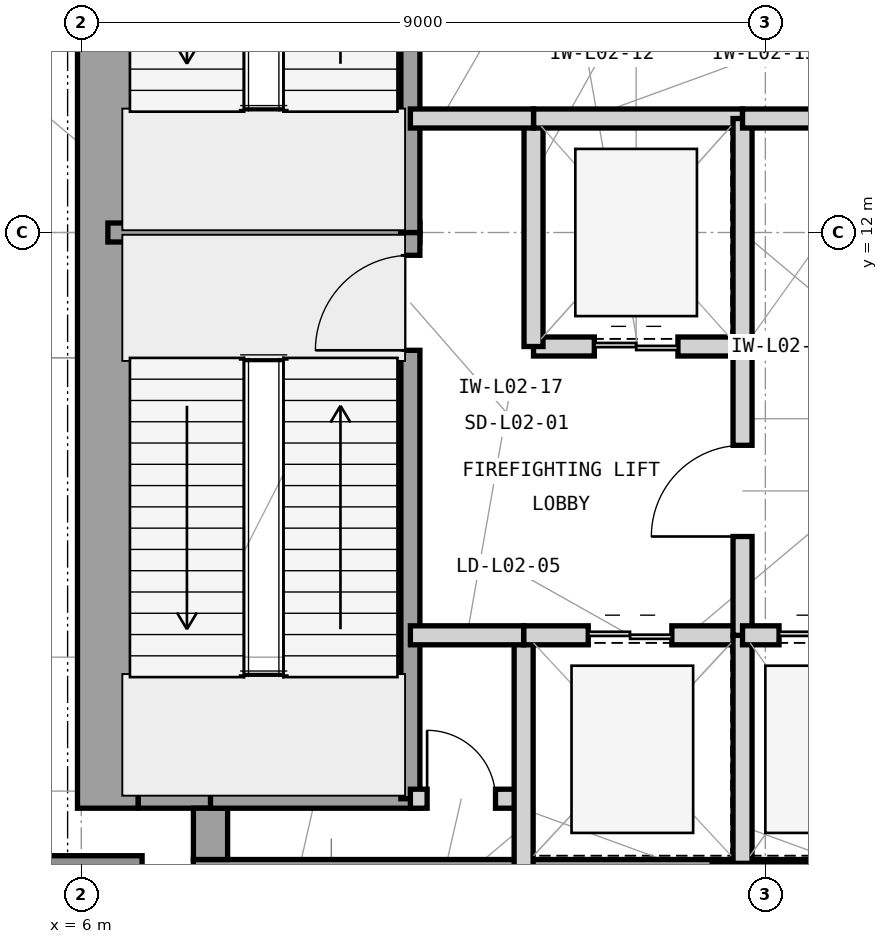
"""IFC4 building model, lengths in metres.
Left out: names, types, materials, properties, quantities, classifications, styles, units other than length and angle.
Written with IfcOpenShell. Run it as: python <this file> out.ifc"""

import sys

from ifc_helpers import new_model, si_unit, direction, frame, frame_2d, origin, origin_2d, place, context, subcontext, project, spatial, rectangle, extrude, element, fill, save


model = new_model("IFC4")
c1 = context("Model", 3, precision=1e-05, world=origin(), true_north=direction((0.0, 1.0)))
c2 = subcontext(c1, "Body", "Model", "MODEL_VIEW")
j1 = project(units=[si_unit("LENGTHUNIT", "METRE"), si_unit("PLANEANGLEUNIT", "RADIAN")], contexts=[c1])
p1 = place(None, origin())
s1 = spatial("IfcSite", under=j1, at=p1, CompositionType="ELEMENT")
p2 = place(p1, origin())
s2 = spatial("IfcBuilding", under=s1, at=p2, CompositionType="ELEMENT")
p3 = place(p2, frame((0.0, 0.0, 10.8)))
s3 = spatial("IfcBuildingStorey", under=s2, at=p3, CompositionType="ELEMENT", Elevation=10.8)
p4 = place(p3, frame((7.475, 3.35, 0.0), z_axis=(0.0, 0.0, 1.0), x_axis=(1.0, 0.0, 0.0)))
e1 = element("IfcWall", 1, at=p4, inside=s3, PredefinedType="SHEAR", context=c2, shape_type="SweptSolid", body=[
    extrude(rectangle(XDim=16.575, YDim=0.8, at=frame_2d((8.288, 0.0))), origin(), (0.0, 0.0, 1.0), 5.4),
])
p5 = place(p3, frame((6.35, 4.425, 0.0), z_axis=(0.0, 0.0, 1.0), x_axis=(0.0, 1.0, 0.0)))
e2 = element("IfcWall", 2, at=p5, inside=s3, PredefinedType="SHEAR", context=c2, shape_type="SweptSolid", body=[
    extrude(rectangle(XDim=15.15, YDim=0.8, at=frame_2d((7.575, 0.0))), origin(), (0.0, 0.0, 1.0), 5.4),
])
p6 = place(p3, frame((6.75, 4.65, 0.0), z_axis=(0.0, 0.0, 1.0), x_axis=(1.0, 0.0, 0.0)))
e3 = element("IfcWall", 3, at=p6, inside=s3, PredefinedType="SHEAR", context=c2, shape_type="SweptSolid", body=[
    extrude(rectangle(XDim=1.175, YDim=0.45, at=frame_2d((0.587, 0.0))), origin(), (0.0, 0.0, 1.0), 5.4),
])
p7 = place(p3, frame((7.7, 3.75, 0.0), z_axis=(0.0, 0.0, 1.0), x_axis=(0.0, 1.0, 0.0)))
e4 = element("IfcWall", 4, at=p7, inside=s3, PredefinedType="SHEAR", context=c2, shape_type="SweptSolid", body=[
    extrude(rectangle(XDim=0.675, YDim=0.45, at=frame_2d((0.337, 0.0))), origin(), (0.0, 0.0, 1.0), 5.4),
])
p8 = place(p3, frame((6.0, 3.0, 0.0), z_axis=(0.0, 0.0, 1.0), x_axis=(1.0, 0.0, 0.0)))
e5 = element("IfcColumn", 5, at=p8, inside=s3, PredefinedType="COLUMN", context=c2, shape_type="SweptSolid", body=[
    extrude(rectangle(XDim=1.6, YDim=1.6, at=origin_2d()), origin(), (0.0, 0.0, 1.0), 4.8),
])
p9 = place(p3, frame((15.0, 3.0, 0.0), z_axis=(0.0, 0.0, 1.0), x_axis=(1.0, 0.0, 0.0)))
e6 = element("IfcColumn", 6, at=p9, inside=s3, PredefinedType="COLUMN", context=c2, shape_type="SweptSolid", body=[
    extrude(rectangle(XDim=1.4, YDim=1.4, at=origin_2d()), origin(), (0.0, 0.0, 1.0), 4.8),
])
p10 = place(p3, frame((6.35, 12.0, 0.0), z_axis=(0.0, 0.0, 1.0), x_axis=(1.0, 0.0, 0.0)))
e7 = element("IfcWall", 7, at=p10, inside=s3, PredefinedType="SHEAR", context=c2, shape_type="SweptSolid", body=[
    extrude(rectangle(XDim=4.105, YDim=0.25, at=frame_2d((2.052, 0.0))), origin(), (0.0, 0.0, 1.0), 5.4),
])
p11 = place(p3, frame((7.7, 4.55, 0.0), z_axis=(0.0, 0.0, 1.0), x_axis=(1.0, 0.0, 0.0)))
e8 = element("IfcWall", 8, at=p11, inside=s3, PredefinedType="SHEAR", context=c2, shape_type="SweptSolid", body=[
    extrude(rectangle(XDim=2.755, YDim=0.25, at=frame_2d((1.377, 0.0))), origin(), (0.0, 0.0, 1.0), 5.4),
])
p12 = place(p3, frame((10.33, 4.55, 0.0), z_axis=(0.0, 0.0, 1.0), x_axis=(0.0, 1.0, 0.0)))
e9 = element("IfcWall", 9, at=p12, inside=s3, PredefinedType="SHEAR", context=c2, shape_type="SweptSolid", body=[
    extrude(rectangle(XDim=7.45, YDim=0.25, at=frame_2d((3.725, 0.0))), origin(), (0.0, 0.0, 1.0), 5.4),
])
p13 = place(p12, frame((5.9, 0.0, 0.0)))
e10 = element("IfcOpeningElement", 10, at=p13, cuts=e9, PredefinedType="OPENING", context=c2, shape_type="SweptSolid", body=[
    extrude(rectangle(XDim=1.25, YDim=2.2, at=frame_2d((0.625, 1.1))), frame((0.0, 0.135, 0.0), z_axis=(0.0, -1.0, 0.0), x_axis=(1.0, 0.0, 0.0)), (0.0, 0.0, 1.0), 0.27),
])
p14 = place(p3, frame((10.33, 12.0, 0.0), z_axis=(0.0, 0.0, 1.0), x_axis=(0.0, 1.0, 0.0)))
e11 = element("IfcWall", 11, at=p14, inside=s3, PredefinedType="SHEAR", context=c2, shape_type="SweptSolid", body=[
    extrude(rectangle(XDim=7.45, YDim=0.25, at=frame_2d((3.725, 0.0))), origin(), (0.0, 0.0, 1.0), 5.4),
])
p15 = place(p14, frame((5.85, 0.0, 0.0)))
e12 = element("IfcOpeningElement", 12, at=p15, cuts=e11, PredefinedType="OPENING", context=c2, shape_type="SweptSolid", body=[
    extrude(rectangle(XDim=1.25, YDim=2.2, at=frame_2d((0.625, 1.1))), frame((0.0, 0.135, 0.0), z_axis=(0.0, -1.0, 0.0), x_axis=(1.0, 0.0, 0.0)), (0.0, 0.0, 1.0), 0.27),
])
p16 = place(p3, frame((10.33, 4.55, 0.0), z_axis=(0.0, 0.0, 1.0), x_axis=(1.0, 0.0, 0.0)))
e13 = element("IfcWall", 13, at=p16, inside=s3, PredefinedType="PARTITIONING", context=c2, shape_type="SweptSolid", body=[
    extrude(rectangle(XDim=1.49, YDim=0.25, at=frame_2d((0.745, 0.0))), origin(), (0.0, 0.0, 1.0), 4.79),
])
p17 = place(p16, frame((0.22, 0.0, 0.0)))
e14 = element("IfcOpeningElement", 14, at=p17, cuts=e13, PredefinedType="OPENING", context=c2, shape_type="SweptSolid", body=[
    extrude(rectangle(XDim=0.9, YDim=2.1, at=frame_2d((0.45, 1.05))), frame((0.0, 0.135, 0.0), z_axis=(0.0, -1.0, 0.0), x_axis=(1.0, 0.0, 0.0)), (0.0, 0.0, 1.0), 0.27),
])
p18 = place(p3, frame((11.82, 3.35, 0.0), z_axis=(0.0, 0.0, 1.0), x_axis=(0.0, 1.0, 0.0)))
e15 = element("IfcWall", 15, at=p18, inside=s3, PredefinedType="PARTITIONING", context=c2, shape_type="SweptSolid", body=[
    extrude(rectangle(XDim=3.35, YDim=0.25, at=frame_2d((1.675, 0.0))), origin(), (0.0, 0.0, 1.0), 4.79),
])
p19 = place(p3, frame((11.82, 6.7, 0.0), z_axis=(0.0, 0.0, 1.0), x_axis=(1.0, 0.0, 0.0)))
e16 = element("IfcWall", 16, at=p19, inside=s3, PredefinedType="PARTITIONING", context=c2, shape_type="SweptSolid", body=[
    extrude(rectangle(XDim=2.88, YDim=0.25, at=frame_2d((1.44, 0.0))), origin(), (0.0, 0.0, 1.0), 4.173),
])
p20 = place(p19, frame((0.85, 0.0, 0.0)))
e17 = element("IfcOpeningElement", 17, at=p20, cuts=e16, PredefinedType="OPENING", context=c2, shape_type="SweptSolid", body=[
    extrude(rectangle(XDim=1.1, YDim=2.25, at=frame_2d((0.55, 1.125))), frame((0.0, 0.135, 0.0), z_axis=(0.0, -1.0, 0.0), x_axis=(1.0, 0.0, 0.0)), (0.0, 0.0, 1.0), 0.27),
])
p21 = place(p3, frame((14.7, 3.35, 0.0), z_axis=(0.0, 0.0, 1.0), x_axis=(0.0, 1.0, 0.0)))
e18 = element("IfcWall", 18, at=p21, inside=s3, PredefinedType="PARTITIONING", context=c2, shape_type="SweptSolid", body=[
    extrude(rectangle(XDim=3.35, YDim=0.25, at=frame_2d((1.675, 0.0))), origin(), (0.0, 0.0, 1.0), 4.79),
])
p22 = place(p3, frame((11.95, 10.5, 0.0), z_axis=(0.0, 0.0, 1.0), x_axis=(1.0, 0.0, 0.0)))
e19 = element("IfcWall", 19, at=p22, inside=s3, PredefinedType="PARTITIONING", context=c2, shape_type="SweptSolid", body=[
    extrude(rectangle(XDim=2.75, YDim=0.25, at=frame_2d((1.375, 0.0))), origin(), (0.0, 0.0, 1.0), 4.173),
])
p23 = place(p22, frame((0.8, 0.0, 0.0)))
e20 = element("IfcOpeningElement", 20, at=p23, cuts=e19, PredefinedType="OPENING", context=c2, shape_type="SweptSolid", body=[
    extrude(rectangle(XDim=1.1, YDim=2.25, at=frame_2d((0.55, 1.125))), frame((0.0, 0.135, 0.0), z_axis=(0.0, -1.0, 0.0), x_axis=(1.0, 0.0, 0.0)), (0.0, 0.0, 1.0), 0.27),
])
p24 = place(p3, frame((11.95, 10.5, 0.0), z_axis=(0.0, 0.0, 1.0), x_axis=(0.0, 1.0, 0.0)))
e21 = element("IfcWall", 21, at=p24, inside=s3, PredefinedType="PARTITIONING", context=c2, shape_type="SweptSolid", body=[
    extrude(rectangle(XDim=3.0, YDim=0.25, at=frame_2d((1.5, 0.0))), origin(), (0.0, 0.0, 1.0), 4.79),
])
p25 = place(p3, frame((11.95, 13.5, 0.0), z_axis=(0.0, 0.0, 1.0), x_axis=(1.0, 0.0, 0.0)))
e22 = element("IfcWall", 22, at=p25, inside=s3, PredefinedType="PARTITIONING", context=c2, shape_type="SweptSolid", body=[
    extrude(rectangle(XDim=2.75, YDim=0.25, at=frame_2d((1.375, 0.0))), origin(), (0.0, 0.0, 1.0), 4.173),
])
p26 = place(p3, frame((14.7, 10.5, 0.0), z_axis=(0.0, 0.0, 1.0), x_axis=(0.0, 1.0, 0.0)))
e23 = element("IfcWall", 23, at=p26, inside=s3, PredefinedType="PARTITIONING", context=c2, shape_type="SweptSolid", body=[
    extrude(rectangle(XDim=3.0, YDim=0.25, at=frame_2d((1.5, 0.0))), origin(), (0.0, 0.0, 1.0), 4.79),
])
p27 = place(p3, frame((14.7, 6.7, 0.0), z_axis=(0.0, 0.0, 1.0), x_axis=(0.0, 1.0, 0.0)))
e24 = element("IfcWall", 24, at=p27, inside=s3, PredefinedType="PARTITIONING", context=c2, shape_type="SweptSolid", body=[
    extrude(rectangle(XDim=3.8, YDim=0.25, at=frame_2d((1.9, 0.0))), origin(), (0.0, 0.0, 1.0), 4.79),
])
p28 = place(p27, frame((1.3, 0.0, 0.0)))
e25 = element("IfcOpeningElement", 25, at=p28, cuts=e24, PredefinedType="OPENING", context=c2, shape_type="SweptSolid", body=[
    extrude(rectangle(XDim=1.2, YDim=2.2, at=frame_2d((0.6, 1.1))), frame((0.0, 0.135, 0.0), z_axis=(0.0, -1.0, 0.0), x_axis=(1.0, 0.0, 0.0)), (0.0, 0.0, 1.0), 0.27),
])
p29 = place(p3, frame((10.33, 13.5, 0.0), z_axis=(0.0, 0.0, 1.0), x_axis=(1.0, 0.0, 0.0)))
e26 = element("IfcWall", 26, at=p29, inside=s3, PredefinedType="PARTITIONING", context=c2, shape_type="SweptSolid", body=[
    extrude(rectangle(XDim=1.62, YDim=0.25, at=frame_2d((0.81, 0.0))), origin(), (0.0, 0.0, 1.0), 4.173),
])
p30 = place(p3, frame((10.33, 6.7, 0.0), z_axis=(0.0, 0.0, 1.0), x_axis=(1.0, 0.0, 0.0)))
e27 = element("IfcWall", 27, at=p30, inside=s3, PredefinedType="PARTITIONING", context=c2, shape_type="SweptSolid", body=[
    extrude(rectangle(XDim=1.49, YDim=0.25, at=frame_2d((0.745, 0.0))), origin(), (0.0, 0.0, 1.0), 4.173),
])
p31 = place(p3, frame((14.7, 6.7, 0.0), z_axis=(0.0, 0.0, 1.0), x_axis=(1.0, 0.0, 0.0)))
e28 = element("IfcWall", 28, at=p31, inside=s3, PredefinedType="PARTITIONING", context=c2, shape_type="SweptSolid", body=[
    extrude(rectangle(XDim=2.15, YDim=0.25, at=frame_2d((1.075, 0.0))), origin(), (0.0, 0.0, 1.0), 4.173),
])
p32 = place(p31, frame((0.48, 0.0, 0.0)))
e29 = element("IfcOpeningElement", 29, at=p32, cuts=e28, PredefinedType="OPENING", context=c2, shape_type="SweptSolid", body=[
    extrude(rectangle(XDim=1.15, YDim=2.25, at=frame_2d((0.575, 1.125))), frame((0.0, 0.135, 0.0), z_axis=(0.0, -1.0, 0.0), x_axis=(1.0, 0.0, 0.0)), (0.0, 0.0, 1.0), 0.27),
])
p33 = place(p3, frame((14.7, 10.5, 0.0), z_axis=(0.0, 0.0, 1.0), x_axis=(1.0, 0.0, 0.0)))
e30 = element("IfcWall", 30, at=p33, inside=s3, PredefinedType="PARTITIONING", context=c2, shape_type="SweptSolid", body=[
    extrude(rectangle(XDim=2.15, YDim=0.25, at=frame_2d((1.075, 0.0))), origin(), (0.0, 0.0, 1.0), 4.173),
])
p34 = place(p3, frame((14.7, 13.5, 0.0), z_axis=(0.0, 0.0, 1.0), x_axis=(1.0, 0.0, 0.0)))
e31 = element("IfcWall", 31, at=p34, inside=s3, PredefinedType="PARTITIONING", context=c2, shape_type="SweptSolid", body=[
    extrude(rectangle(XDim=8.95, YDim=0.25, at=frame_2d((4.475, 0.0))), origin(), (0.0, 0.0, 1.0), 4.173),
])
p35 = place(p13, origin())
e32 = element("IfcDoor", 32, at=p35, inside=s3, OperationType="SINGLE_SWING_LEFT", PredefinedType="DOOR", context=c2, shape_type="SweptSolid", body=[
    extrude(rectangle(XDim=1.25, YDim=2.2, at=frame_2d((0.625, 1.1))), frame((0.0, 0.025, 0.0), z_axis=(0.0, -1.0, 0.0), x_axis=(1.0, 0.0, 0.0)), (0.0, 0.0, 1.0), 0.05),
])
fill(e10, e32)
p36 = place(p17, origin())
e33 = element("IfcDoor", 33, at=p36, inside=s3, OperationType="SINGLE_SWING_LEFT", PredefinedType="TRAPDOOR", context=c2, shape_type="SweptSolid", body=[
    extrude(rectangle(XDim=0.9, YDim=2.1, at=frame_2d((0.45, 1.05))), frame((0.0, 0.025, 0.0), z_axis=(0.0, -1.0, 0.0), x_axis=(1.0, 0.0, 0.0)), (0.0, 0.0, 1.0), 0.05),
])
fill(e14, e33)
p37 = place(p20, origin())
e34 = element("IfcDoor", 34, at=p37, inside=s3, OperationType="DOUBLE_DOOR_SLIDING", PredefinedType="DOOR", context=c2, shape_type="SweptSolid", body=[
    extrude(rectangle(XDim=1.1, YDim=2.25, at=frame_2d((0.55, 1.125))), frame((0.0, 0.025, 0.0), z_axis=(0.0, -1.0, 0.0), x_axis=(1.0, 0.0, 0.0)), (0.0, 0.0, 1.0), 0.05),
])
fill(e17, e34)
p38 = place(p23, origin())
e35 = element("IfcDoor", 35, at=p38, inside=s3, OperationType="DOUBLE_DOOR_SLIDING", PredefinedType="DOOR", context=c2, shape_type="SweptSolid", body=[
    extrude(rectangle(XDim=1.1, YDim=2.25, at=frame_2d((0.55, 1.125))), frame((0.0, 0.025, 0.0), z_axis=(0.0, -1.0, 0.0), x_axis=(1.0, 0.0, 0.0)), (0.0, 0.0, 1.0), 0.05),
])
fill(e20, e35)
p39 = place(p28, origin())
e36 = element("IfcDoor", 36, at=p39, inside=s3, OperationType="SINGLE_SWING_LEFT", PredefinedType="DOOR", context=c2, shape_type="SweptSolid", body=[
    extrude(rectangle(XDim=1.2, YDim=2.2, at=frame_2d((0.6, 1.1))), frame((0.0, 0.025, 0.0), z_axis=(0.0, -1.0, 0.0), x_axis=(1.0, 0.0, 0.0)), (0.0, 0.0, 1.0), 0.05),
])
fill(e25, e36)
p40 = place(p32, origin())
e37 = element("IfcDoor", 37, at=p40, inside=s3, OperationType="DOUBLE_DOOR_SLIDING", PredefinedType="DOOR", context=c2, shape_type="SweptSolid", body=[
    extrude(rectangle(XDim=1.15, YDim=2.25, at=frame_2d((0.575, 1.125))), frame((0.0, 0.025, 0.0), z_axis=(0.0, -1.0, 0.0), x_axis=(1.0, 0.0, 0.0)), (0.0, 0.0, 1.0), 0.05),
])
fill(e29, e37)
save(model, sys.argv[1])
